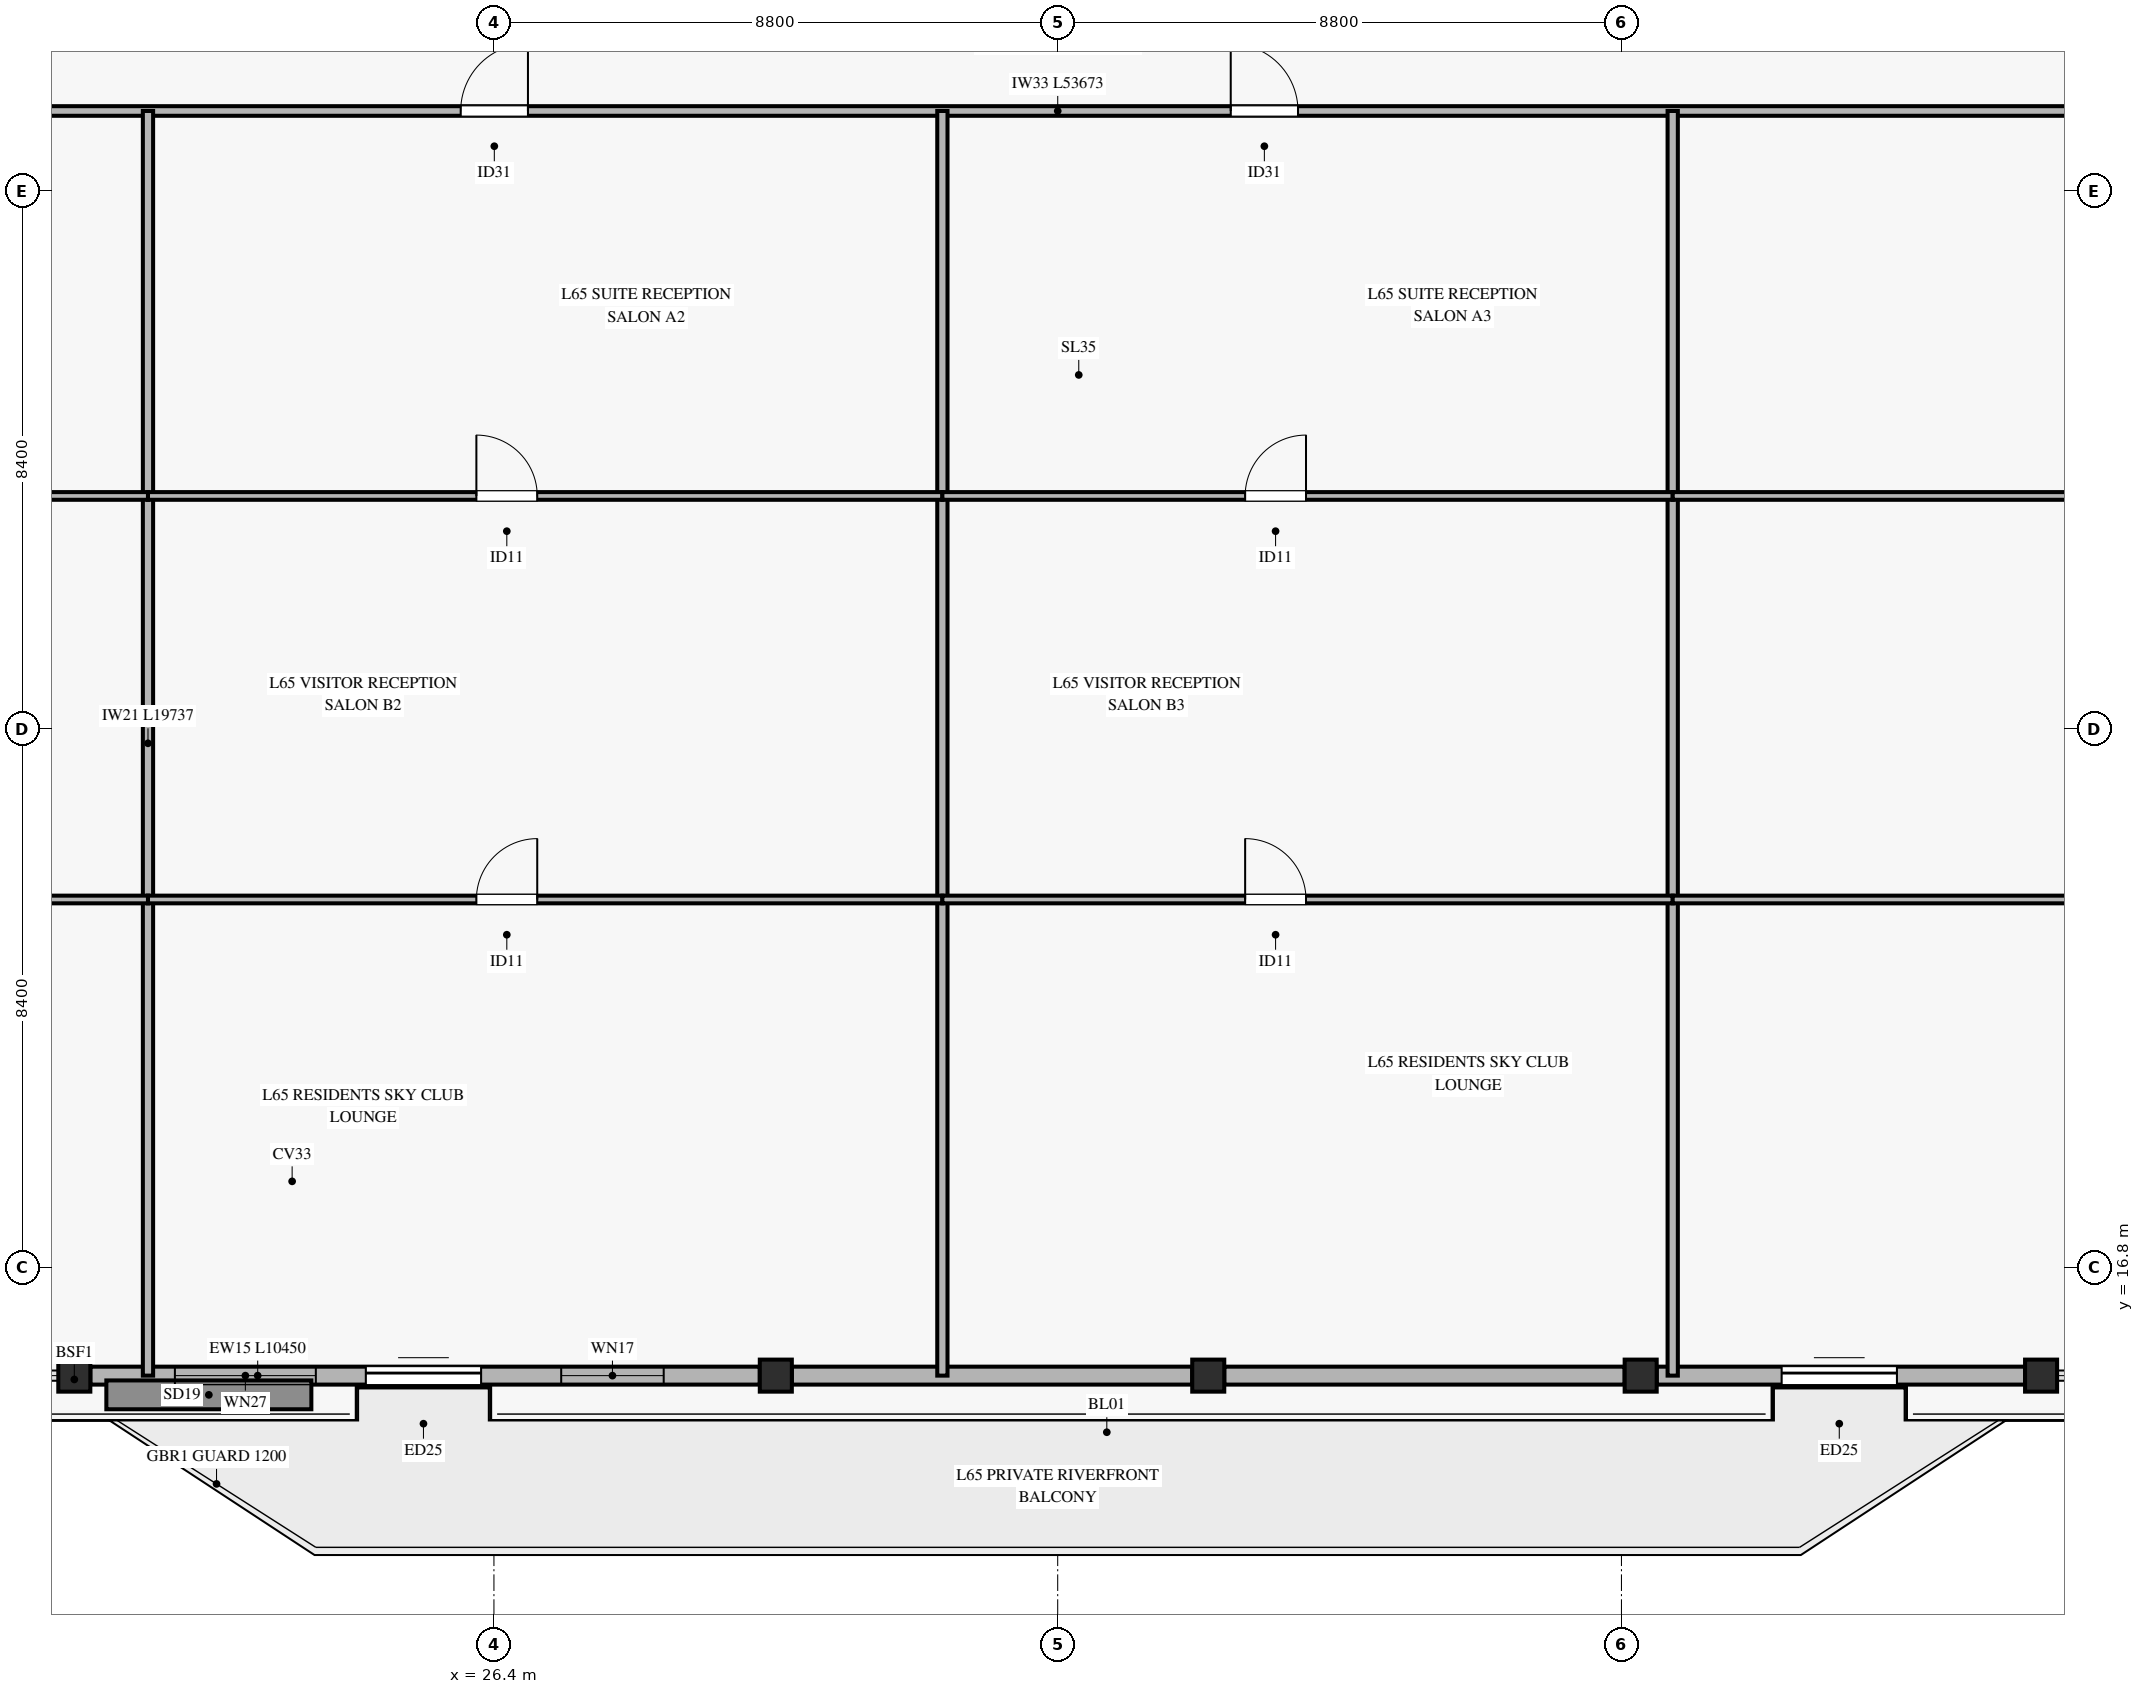
"""IFC4 building model, lengths in metres.
Left out: names, types, materials, properties, quantities, classifications, styles, units other than length and angle.
Written with IfcOpenShell. Run it as: python <this file> out.ifc"""

import sys

from ifc_helpers import new_model, si_unit, direction, frame, frame_2d, origin, origin_2d, place, context, subcontext, project, spatial, rectangle, hollow_rectangle, extrude, source, transform, mapped, element, fill, save


model = new_model("IFC4")
c1 = context("Model", 3, precision=1e-05, world=origin(), true_north=direction((0.0, 1.0)))
c2 = subcontext(c1, "Body", "Model", "MODEL_VIEW")
j1 = project(units=[si_unit("LENGTHUNIT", "METRE"), si_unit("PLANEANGLEUNIT", "RADIAN")], contexts=[c1])
p1 = place(None, origin())
s1 = spatial("IfcSite", under=j1, at=p1, CompositionType="ELEMENT")
p2 = place(p1, origin())
s2 = spatial("IfcBuilding", under=s1, at=p2, CompositionType="ELEMENT")
p3 = place(p2, frame((0.0, 0.0, 255.3)))
s3 = spatial("IfcBuildingStorey", under=s2, at=p3, CompositionType="ELEMENT", Elevation=255.3)
m1 = source(origin(), c2, "Body", "SweptSolid", [
    extrude(hollow_rectangle(XDim=0.5, YDim=0.5, WallThickness=0.024, at=origin_2d()), origin(), (0.0, 0.0, 1.0), 3.319),
])
for number, where, z_axis, x_axis in (
    (1, (19.85, 15.113, 0.0), (0.0, 0.281, 0.96), (-1.0, 0.0, 0.0)),
    (2, (30.8, 15.113, 0.0), (0.0, 0.281, 0.96), (-1.0, 0.0, 0.0)),
    (3, (37.55, 15.113, 0.0), (0.0, 0.281, 0.96), (-1.0, 0.0, 0.0)),
    (4, (44.3, 15.113, 0.0), (0.0, 0.281, 0.96), (-1.0, 0.0, 0.0)),
    (5, (50.55, 15.113, 0.0), (0.0, 0.281, 0.96), (-1.0, 0.0, 0.0)),
):
    element("IfcColumn", number, at=place(p3, frame(where, z_axis=z_axis, x_axis=x_axis)), inside=s3, PredefinedType="COLUMN", context=c2, shape_type="MappedRepresentation", body=[
        mapped(m1, transform((0.0, 0.0, 0.0), x_axis=(1.0, 0.0, 0.0), y_axis=(0.0, 1.0, 0.0), z_axis=(0.0, 0.0, 1.0), scale=1.0)),
    ])
p4 = place(p3, frame((20.1, 15.113, 0.0), z_axis=(0.0, 0.0, 1.0), x_axis=(1.0, 0.0, 0.0)))
e6 = element("IfcWall", 6, at=p4, inside=s3, PredefinedType="SOLIDWALL", context=c2, shape_type="SweptSolid", body=[
    extrude(rectangle(XDim=10.45, YDim=0.28, at=frame_2d((5.225, 0.0))), origin(), (0.0, 0.0, 1.0), 2.815),
])
p5 = place(p4, frame((4.3, 0.0, 0.0)))
e7 = element("IfcOpeningElement", 7, at=p5, cuts=e6, PredefinedType="OPENING", context=c2, shape_type="SweptSolid", body=[
    extrude(rectangle(XDim=1.8, YDim=2.25, at=frame_2d((0.9, 1.125))), frame((0.0, 0.15, 0.0), z_axis=(0.0, -1.0, 0.0), x_axis=(1.0, 0.0, 0.0)), (0.0, 0.0, 1.0), 0.3),
])
p6 = place(p4, frame((1.32, 0.0, 0.45)))
e8 = element("IfcOpeningElement", 8, at=p6, cuts=e6, PredefinedType="OPENING", context=c2, shape_type="SweptSolid", body=[
    extrude(rectangle(XDim=2.2, YDim=2.1, at=frame_2d((1.1, 1.05))), frame((0.0, 0.15, 0.0), z_axis=(0.0, -1.0, 0.0), x_axis=(1.0, 0.0, 0.0)), (0.0, 0.0, 1.0), 0.3),
])
p7 = place(p4, frame((7.35, 0.0, 0.45)))
e9 = element("IfcOpeningElement", 9, at=p7, cuts=e6, PredefinedType="OPENING", context=c2, shape_type="SweptSolid", body=[
    extrude(rectangle(XDim=1.6, YDim=2.0, at=frame_2d((0.8, 1.0))), frame((0.0, 0.15, 0.0), z_axis=(0.0, -1.0, 0.0), x_axis=(1.0, 0.0, 0.0)), (0.0, 0.0, 1.0), 0.3),
])
for number, where, z_axis, x_axis in (
    (10, (31.05, 15.113, 0.0), (0.0, 0.0, 1.0), (1.0, 0.0, 0.0)),
    (11, (37.8, 15.113, 0.0), (0.0, 0.0, 1.0), (1.0, 0.0, 0.0)),
):
    element("IfcWall", number, at=place(p3, frame(where, z_axis=z_axis, x_axis=x_axis)), inside=s3, PredefinedType="SOLIDWALL", context=c2, shape_type="SweptSolid", body=[
        extrude(rectangle(XDim=6.25, YDim=0.28, at=frame_2d((3.125, 0.0))), origin(), (0.0, 0.0, 1.0), 2.815),
    ])
p8 = place(p3, frame((44.55, 15.113, 0.0), z_axis=(0.0, 0.0, 1.0), x_axis=(1.0, 0.0, 0.0)))
e12 = element("IfcWall", 12, at=p8, inside=s3, PredefinedType="SOLIDWALL", context=c2, shape_type="SweptSolid", body=[
    extrude(rectangle(XDim=5.75, YDim=0.28, at=frame_2d((2.875, 0.0))), origin(), (0.0, 0.0, 1.0), 2.815),
])
p9 = place(p8, frame((1.95, 0.0, 0.0)))
e13 = element("IfcOpeningElement", 13, at=p9, cuts=e12, PredefinedType="OPENING", context=c2, shape_type="SweptSolid", body=[
    extrude(rectangle(XDim=1.8, YDim=2.25, at=frame_2d((0.9, 1.125))), frame((0.0, 0.15, 0.0), z_axis=(0.0, -1.0, 0.0), x_axis=(1.0, 0.0, 0.0)), (0.0, 0.0, 1.0), 0.3),
])
p10 = place(p3, frame((8.364, 34.85, 0.0), z_axis=(0.0, 0.0, 1.0), x_axis=(1.0, 0.0, 0.0)))
e14 = element("IfcWall", 14, at=p10, inside=s3, PredefinedType="PARTITIONING", context=c2, shape_type="SweptSolid", body=[
    extrude(rectangle(XDim=53.673, YDim=0.15, at=frame_2d((26.836, 0.0))), origin(), (0.0, 0.0, 1.0), 2.47),
])
p11 = place(p10, frame((5.352, 0.0, 0.0)))
e15 = element("IfcOpeningElement", 15, at=p11, cuts=e14, PredefinedType="OPENING", context=c2, shape_type="SweptSolid", body=[
    extrude(rectangle(XDim=1.05, YDim=2.15, at=frame_2d((0.525, 1.075))), frame((0.0, 0.085, 0.0), z_axis=(0.0, -1.0, 0.0), x_axis=(1.0, 0.0, 0.0)), (0.0, 0.0, 1.0), 0.17),
])
p12 = place(p10, frame((17.517, 0.0, 0.0)))
e16 = element("IfcOpeningElement", 16, at=p12, cuts=e14, PredefinedType="OPENING", context=c2, shape_type="SweptSolid", body=[
    extrude(rectangle(XDim=1.05, YDim=2.15, at=frame_2d((0.525, 1.075))), frame((0.0, 0.085, 0.0), z_axis=(0.0, -1.0, 0.0), x_axis=(1.0, 0.0, 0.0)), (0.0, 0.0, 1.0), 0.17),
])
p13 = place(p10, frame((29.537, 0.0, 0.0)))
e17 = element("IfcOpeningElement", 17, at=p13, cuts=e14, PredefinedType="OPENING", context=c2, shape_type="SweptSolid", body=[
    extrude(rectangle(XDim=1.05, YDim=2.15, at=frame_2d((0.525, 1.075))), frame((0.0, 0.085, 0.0), z_axis=(0.0, -1.0, 0.0), x_axis=(1.0, 0.0, 0.0)), (0.0, 0.0, 1.0), 0.17),
])
p14 = place(p10, frame((42.922, 0.0, 0.0)))
e18 = element("IfcOpeningElement", 18, at=p14, cuts=e14, PredefinedType="OPENING", context=c2, shape_type="SweptSolid", body=[
    extrude(rectangle(XDim=1.05, YDim=2.15, at=frame_2d((0.525, 1.075))), frame((0.0, 0.085, 0.0), z_axis=(0.0, -1.0, 0.0), x_axis=(1.0, 0.0, 0.0)), (0.0, 0.0, 1.0), 0.17),
])
for number, where, z_axis, x_axis in (
    (19, (21.0, 15.113, 0.0), (0.0, 0.0, 1.0), (0.0, 1.0, 0.0)),
    (20, (33.4, 15.113, 0.0), (0.0, 0.0, 1.0), (0.0, 1.0, 0.0)),
    (21, (44.8, 15.113, 0.0), (0.0, 0.0, 1.0), (0.0, 1.0, 0.0)),
):
    element("IfcWall", number, at=place(p3, frame(where, z_axis=z_axis, x_axis=x_axis)), inside=s3, PredefinedType="PARTITIONING", context=c2, shape_type="SweptSolid", body=[
        extrude(rectangle(XDim=19.737, YDim=0.16, at=frame_2d((9.869, 0.0))), origin(), (0.0, 0.0, 1.0), 2.77),
    ])
p15 = place(p3, frame((8.364, 22.544, 0.0), z_axis=(0.0, 0.0, 1.0), x_axis=(1.0, 0.0, 0.0)))
e22 = element("IfcWall", 22, at=p15, inside=s3, PredefinedType="PARTITIONING", context=c2, shape_type="SweptSolid", body=[
    extrude(rectangle(XDim=12.636, YDim=0.12, at=frame_2d((6.318, 0.0))), origin(), (0.0, 0.0, 1.0), 2.47),
])
p16 = place(p15, frame((5.589, 0.0, 0.0)))
e23 = element("IfcOpeningElement", 23, at=p16, cuts=e22, PredefinedType="OPENING", context=c2, shape_type="SweptSolid", body=[
    extrude(rectangle(XDim=0.95, YDim=2.1, at=frame_2d((0.475, 1.05))), frame((0.0, 0.07, 0.0), z_axis=(0.0, -1.0, 0.0), x_axis=(1.0, 0.0, 0.0)), (0.0, 0.0, 1.0), 0.14),
])
p17 = place(p3, frame((8.364, 28.842, 0.0), z_axis=(0.0, 0.0, 1.0), x_axis=(1.0, 0.0, 0.0)))
e24 = element("IfcWall", 24, at=p17, inside=s3, PredefinedType="PARTITIONING", context=c2, shape_type="SweptSolid", body=[
    extrude(rectangle(XDim=12.636, YDim=0.12, at=frame_2d((6.318, 0.0))), origin(), (0.0, 0.0, 1.0), 2.47),
])
p18 = place(p17, frame((5.589, 0.0, 0.0)))
e25 = element("IfcOpeningElement", 25, at=p18, cuts=e24, PredefinedType="OPENING", context=c2, shape_type="SweptSolid", body=[
    extrude(rectangle(XDim=0.95, YDim=2.1, at=frame_2d((0.475, 1.05))), frame((0.0, 0.07, 0.0), z_axis=(0.0, -1.0, 0.0), x_axis=(1.0, 0.0, 0.0)), (0.0, 0.0, 1.0), 0.14),
])
p19 = place(p3, frame((21.0, 22.544, 0.0), z_axis=(0.0, 0.0, 1.0), x_axis=(1.0, 0.0, 0.0)))
e26 = element("IfcWall", 26, at=p19, inside=s3, PredefinedType="PARTITIONING", context=c2, shape_type="SweptSolid", body=[
    extrude(rectangle(XDim=12.4, YDim=0.12, at=frame_2d((6.2, 0.0))), origin(), (0.0, 0.0, 1.0), 2.47),
])
p20 = place(p19, frame((5.126, 0.0, 0.0)))
e27 = element("IfcOpeningElement", 27, at=p20, cuts=e26, PredefinedType="OPENING", context=c2, shape_type="SweptSolid", body=[
    extrude(rectangle(XDim=0.95, YDim=2.1, at=frame_2d((0.475, 1.05))), frame((0.0, 0.07, 0.0), z_axis=(0.0, -1.0, 0.0), x_axis=(1.0, 0.0, 0.0)), (0.0, 0.0, 1.0), 0.14),
])
p21 = place(p3, frame((21.0, 28.842, 0.0), z_axis=(0.0, 0.0, 1.0), x_axis=(1.0, 0.0, 0.0)))
e28 = element("IfcWall", 28, at=p21, inside=s3, PredefinedType="PARTITIONING", context=c2, shape_type="SweptSolid", body=[
    extrude(rectangle(XDim=12.4, YDim=0.12, at=frame_2d((6.2, 0.0))), origin(), (0.0, 0.0, 1.0), 2.47),
])
p22 = place(p21, frame((5.126, 0.0, 0.0)))
e29 = element("IfcOpeningElement", 29, at=p22, cuts=e28, PredefinedType="OPENING", context=c2, shape_type="SweptSolid", body=[
    extrude(rectangle(XDim=0.95, YDim=2.1, at=frame_2d((0.475, 1.05))), frame((0.0, 0.07, 0.0), z_axis=(0.0, -1.0, 0.0), x_axis=(1.0, 0.0, 0.0)), (0.0, 0.0, 1.0), 0.14),
])
p23 = place(p3, frame((33.4, 22.544, 0.0), z_axis=(0.0, 0.0, 1.0), x_axis=(1.0, 0.0, 0.0)))
e30 = element("IfcWall", 30, at=p23, inside=s3, PredefinedType="PARTITIONING", context=c2, shape_type="SweptSolid", body=[
    extrude(rectangle(XDim=11.4, YDim=0.12, at=frame_2d((5.7, 0.0))), origin(), (0.0, 0.0, 1.0), 2.47),
])
p24 = place(p23, frame((4.726, 0.0, 0.0)))
e31 = element("IfcOpeningElement", 31, at=p24, cuts=e30, PredefinedType="OPENING", context=c2, shape_type="SweptSolid", body=[
    extrude(rectangle(XDim=0.95, YDim=2.1, at=frame_2d((0.475, 1.05))), frame((0.0, 0.07, 0.0), z_axis=(0.0, -1.0, 0.0), x_axis=(1.0, 0.0, 0.0)), (0.0, 0.0, 1.0), 0.14),
])
p25 = place(p3, frame((33.4, 28.842, 0.0), z_axis=(0.0, 0.0, 1.0), x_axis=(1.0, 0.0, 0.0)))
e32 = element("IfcWall", 32, at=p25, inside=s3, PredefinedType="PARTITIONING", context=c2, shape_type="SweptSolid", body=[
    extrude(rectangle(XDim=11.4, YDim=0.12, at=frame_2d((5.7, 0.0))), origin(), (0.0, 0.0, 1.0), 2.47),
])
p26 = place(p25, frame((4.726, 0.0, 0.0)))
e33 = element("IfcOpeningElement", 33, at=p26, cuts=e32, PredefinedType="OPENING", context=c2, shape_type="SweptSolid", body=[
    extrude(rectangle(XDim=0.95, YDim=2.1, at=frame_2d((0.475, 1.05))), frame((0.0, 0.07, 0.0), z_axis=(0.0, -1.0, 0.0), x_axis=(1.0, 0.0, 0.0)), (0.0, 0.0, 1.0), 0.14),
])
p27 = place(p3, frame((44.8, 22.544, 0.0), z_axis=(0.0, 0.0, 1.0), x_axis=(1.0, 0.0, 0.0)))
e34 = element("IfcWall", 34, at=p27, inside=s3, PredefinedType="PARTITIONING", context=c2, shape_type="SweptSolid", body=[
    extrude(rectangle(XDim=17.237, YDim=0.12, at=frame_2d((8.619, 0.0))), origin(), (0.0, 0.0, 1.0), 2.47),
])
p28 = place(p27, frame((6.815, 0.0, 0.0)))
e35 = element("IfcOpeningElement", 35, at=p28, cuts=e34, PredefinedType="OPENING", context=c2, shape_type="SweptSolid", body=[
    extrude(rectangle(XDim=0.95, YDim=2.1, at=frame_2d((0.475, 1.05))), frame((0.0, 0.07, 0.0), z_axis=(0.0, -1.0, 0.0), x_axis=(1.0, 0.0, 0.0)), (0.0, 0.0, 1.0), 0.14),
])
p29 = place(p3, frame((44.8, 28.842, 0.0), z_axis=(0.0, 0.0, 1.0), x_axis=(1.0, 0.0, 0.0)))
e36 = element("IfcWall", 36, at=p29, inside=s3, PredefinedType="PARTITIONING", context=c2, shape_type="SweptSolid", body=[
    extrude(rectangle(XDim=17.237, YDim=0.12, at=frame_2d((8.619, 0.0))), origin(), (0.0, 0.0, 1.0), 2.47),
])
p30 = place(p29, frame((6.815, 0.0, 0.0)))
e37 = element("IfcOpeningElement", 37, at=p30, cuts=e36, PredefinedType="OPENING", context=c2, shape_type="SweptSolid", body=[
    extrude(rectangle(XDim=0.95, YDim=2.1, at=frame_2d((0.475, 1.05))), frame((0.0, 0.07, 0.0), z_axis=(0.0, -1.0, 0.0), x_axis=(1.0, 0.0, 0.0)), (0.0, 0.0, 1.0), 0.14),
])
m2 = source(origin(), c2, "Body", "SweptSolid", [
    extrude(rectangle(XDim=1.8, YDim=2.25, at=frame_2d((0.9, 1.125))), frame((0.0, 0.025, 0.0), z_axis=(0.0, -1.0, 0.0), x_axis=(1.0, 0.0, 0.0)), (0.0, 0.0, 1.0), 0.05),
])
p31 = place(p5, origin())
e38 = element("IfcDoor", 38, at=p31, inside=s3, OperationType="SLIDING_TO_LEFT", PredefinedType="DOOR", context=c2, shape_type="MappedRepresentation", body=[
    mapped(m2, transform((0.0, 0.0, 0.0), x_axis=(1.0, 0.0, 0.0), y_axis=(0.0, 1.0, 0.0), z_axis=(0.0, 0.0, 1.0), scale=1.0)),
])
fill(e7, e38)
m3 = source(origin(), c2, "Body", "SweptSolid", [
    extrude(rectangle(XDim=2.2, YDim=2.1, at=frame_2d((1.1, 1.05))), frame((0.0, 0.03, 0.0), z_axis=(0.0, -1.0, 0.0), x_axis=(1.0, 0.0, 0.0)), (0.0, 0.0, 1.0), 0.06),
])
p32 = place(p6, origin())
e39 = element("IfcWindow", 39, at=p32, inside=s3, PartitioningType="SINGLE_PANEL", PredefinedType="WINDOW", context=c2, shape_type="MappedRepresentation", body=[
    mapped(m3, transform((0.0, 0.0, 0.0), x_axis=(1.0, 0.0, 0.0), y_axis=(0.0, 1.0, 0.0), z_axis=(0.0, 0.0, 1.0), scale=1.0)),
])
fill(e8, e39)
m4 = source(origin(), c2, "Body", "SweptSolid", [
    extrude(rectangle(XDim=1.6, YDim=2.0, at=frame_2d((0.8, 1.0))), frame((0.0, 0.03, 0.0), z_axis=(0.0, -1.0, 0.0), x_axis=(1.0, 0.0, 0.0)), (0.0, 0.0, 1.0), 0.06),
])
p33 = place(p7, origin())
e40 = element("IfcWindow", 40, at=p33, inside=s3, PartitioningType="SINGLE_PANEL", PredefinedType="WINDOW", context=c2, shape_type="MappedRepresentation", body=[
    mapped(m4, transform((0.0, 0.0, 0.0), x_axis=(1.0, 0.0, 0.0), y_axis=(0.0, 1.0, 0.0), z_axis=(0.0, 0.0, 1.0), scale=1.0)),
])
fill(e9, e40)
p34 = place(p9, origin())
e41 = element("IfcDoor", 41, at=p34, inside=s3, OperationType="SLIDING_TO_LEFT", PredefinedType="DOOR", context=c2, shape_type="MappedRepresentation", body=[
    mapped(m2, transform((0.0, 0.0, 0.0), x_axis=(1.0, 0.0, 0.0), y_axis=(0.0, 1.0, 0.0), z_axis=(0.0, 0.0, 1.0), scale=1.0)),
])
fill(e13, e41)
m5 = source(origin(), c2, "Body", "SweptSolid", [
    extrude(rectangle(XDim=1.05, YDim=2.15, at=frame_2d((0.525, 1.075))), frame((0.0, 0.025, 0.0), z_axis=(0.0, -1.0, 0.0), x_axis=(1.0, 0.0, 0.0)), (0.0, 0.0, 1.0), 0.05),
])
p35 = place(p12, origin())
e42 = element("IfcDoor", 42, at=p35, inside=s3, OperationType="SINGLE_SWING_RIGHT", PredefinedType="DOOR", context=c2, shape_type="MappedRepresentation", body=[
    mapped(m5, transform((0.0, 0.0, 0.0), x_axis=(1.0, 0.0, 0.0), y_axis=(0.0, 1.0, 0.0), z_axis=(0.0, 0.0, 1.0), scale=1.0)),
])
fill(e16, e42)
m6 = source(origin(), c2, "Body", "SweptSolid", [
    extrude(rectangle(XDim=0.95, YDim=2.1, at=frame_2d((0.475, 1.05))), frame((0.0, 0.025, 0.0), z_axis=(0.0, -1.0, 0.0), x_axis=(1.0, 0.0, 0.0)), (0.0, 0.0, 1.0), 0.05),
])
p36 = place(p22, origin())
e43 = element("IfcDoor", 43, at=p36, inside=s3, OperationType="SINGLE_SWING_LEFT", PredefinedType="DOOR", context=c2, shape_type="MappedRepresentation", body=[
    mapped(m6, transform((0.0, 0.0, 0.0), x_axis=(1.0, 0.0, 0.0), y_axis=(0.0, 1.0, 0.0), z_axis=(0.0, 0.0, 1.0), scale=1.0)),
])
fill(e29, e43)
p37 = place(p20, origin())
e44 = element("IfcDoor", 44, at=p37, inside=s3, OperationType="SINGLE_SWING_RIGHT", PredefinedType="DOOR", context=c2, shape_type="MappedRepresentation", body=[
    mapped(m6, transform((0.0, 0.0, 0.0), x_axis=(1.0, 0.0, 0.0), y_axis=(0.0, 1.0, 0.0), z_axis=(0.0, 0.0, 1.0), scale=1.0)),
])
fill(e27, e44)
p38 = place(p13, origin())
e45 = element("IfcDoor", 45, at=p38, inside=s3, OperationType="SINGLE_SWING_LEFT", PredefinedType="DOOR", context=c2, shape_type="MappedRepresentation", body=[
    mapped(m5, transform((0.0, 0.0, 0.0), x_axis=(1.0, 0.0, 0.0), y_axis=(0.0, 1.0, 0.0), z_axis=(0.0, 0.0, 1.0), scale=1.0)),
])
fill(e17, e45)
p39 = place(p26, origin())
e46 = element("IfcDoor", 46, at=p39, inside=s3, OperationType="SINGLE_SWING_RIGHT", PredefinedType="DOOR", context=c2, shape_type="MappedRepresentation", body=[
    mapped(m6, transform((0.0, 0.0, 0.0), x_axis=(1.0, 0.0, 0.0), y_axis=(0.0, 1.0, 0.0), z_axis=(0.0, 0.0, 1.0), scale=1.0)),
])
fill(e33, e46)
p40 = place(p24, origin())
e47 = element("IfcDoor", 47, at=p40, inside=s3, OperationType="SINGLE_SWING_LEFT", PredefinedType="DOOR", context=c2, shape_type="MappedRepresentation", body=[
    mapped(m6, transform((0.0, 0.0, 0.0), x_axis=(1.0, 0.0, 0.0), y_axis=(0.0, 1.0, 0.0), z_axis=(0.0, 0.0, 1.0), scale=1.0)),
])
fill(e31, e47)
save(model, sys.argv[1])
